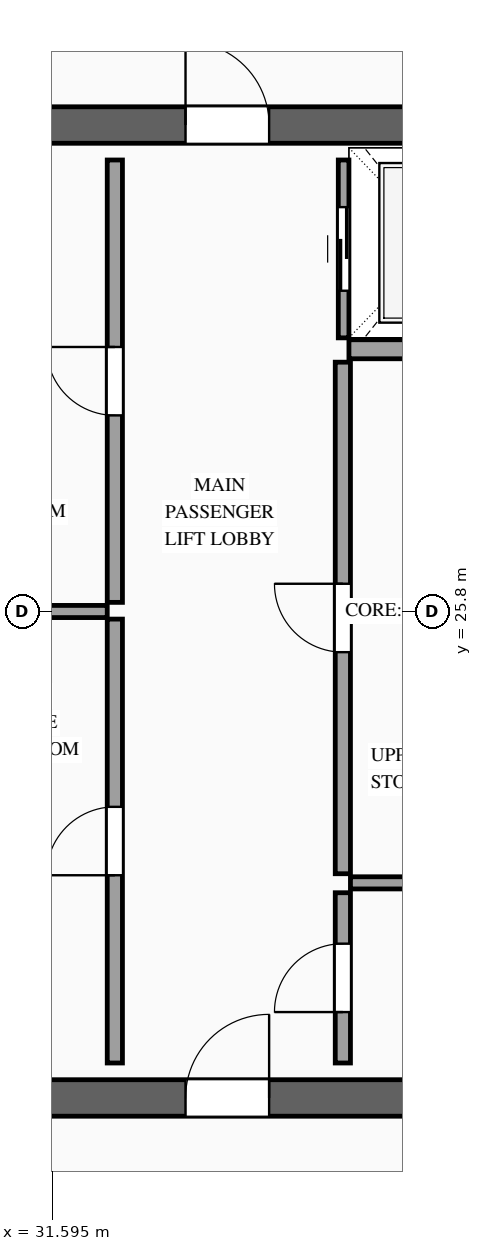
"""IFC4 building model, lengths in metres.
Left out: names, types, materials, properties, quantities, classifications, styles, units other than length and angle.
Written with IfcOpenShell. Run it as: python <this file> out.ifc"""

import sys

from ifc_helpers import new_model, si_unit, direction, frame, frame_2d, origin, place, context, subcontext, project, spatial, rectangle, extrude, source, transform, mapped, element, fill, save


model = new_model("IFC4")
c1 = context("Model", 3, precision=1e-05, world=origin(), true_north=direction((0.0, 1.0)))
c2 = subcontext(c1, "Body", "Model", "MODEL_VIEW")
j1 = project(units=[si_unit("LENGTHUNIT", "METRE"), si_unit("PLANEANGLEUNIT", "RADIAN")], contexts=[c1])
p1 = place(None, origin())
s1 = spatial("IfcSite", under=j1, at=p1, CompositionType="ELEMENT")
p2 = place(p1, origin())
s2 = spatial("IfcBuilding", under=s1, at=p2, CompositionType="ELEMENT")
p3 = place(p2, frame((0.0, 0.0, 296.1)))
s3 = spatial("IfcBuildingStorey", under=s2, at=p3, CompositionType="ELEMENT", Elevation=296.1)
p4 = place(p3, frame((23.56, 19.4, 0.0), z_axis=(0.0, 0.0, 1.0), x_axis=(1.0, 0.0, 0.0)))
e1 = element("IfcWall", 1, at=p4, inside=s3, PredefinedType="SHEAR", context=c2, shape_type="SweptSolid", body=[
    extrude(rectangle(XDim=26.88, YDim=0.48, at=frame_2d((13.44, 0.0))), origin(), (0.0, 0.0, 1.0), 3.5),
])
p5 = place(p4, frame((1.89, 0.0, 0.0)))
e2 = element("IfcOpeningElement", 2, at=p5, cuts=e1, PredefinedType="OPENING", context=c2, shape_type="SweptSolid", body=[
    extrude(rectangle(XDim=1.1, YDim=2.2, at=frame_2d((0.55, 1.1))), frame((0.0, 0.255, 0.0), z_axis=(0.0, -1.0, 0.0), x_axis=(1.0, 0.0, 0.0)), (0.0, 0.0, 1.0), 0.51),
])
p6 = place(p4, frame((9.79, 0.0, 0.0)))
e3 = element("IfcOpeningElement", 3, at=p6, cuts=e1, PredefinedType="OPENING", context=c2, shape_type="SweptSolid", body=[
    extrude(rectangle(XDim=1.1, YDim=2.2, at=frame_2d((0.55, 1.1))), frame((0.0, 0.255, 0.0), z_axis=(0.0, -1.0, 0.0), x_axis=(1.0, 0.0, 0.0)), (0.0, 0.0, 1.0), 0.51),
])
p7 = place(p4, frame((22.99, 0.0, 0.0)))
e4 = element("IfcOpeningElement", 4, at=p7, cuts=e1, PredefinedType="OPENING", context=c2, shape_type="SweptSolid", body=[
    extrude(rectangle(XDim=1.1, YDim=2.2, at=frame_2d((0.55, 1.1))), frame((0.0, 0.255, 0.0), z_axis=(0.0, -1.0, 0.0), x_axis=(1.0, 0.0, 0.0)), (0.0, 0.0, 1.0), 0.51),
])
p8 = place(p4, frame((19.61, 0.0, 0.0)))
e5 = element("IfcOpeningElement", 5, at=p8, cuts=e1, PredefinedType="OPENING", context=c2, shape_type="SweptSolid", body=[
    extrude(rectangle(XDim=0.9, YDim=2.15, at=frame_2d((0.45, 1.075))), frame((0.0, 0.255, 0.0), z_axis=(0.0, -1.0, 0.0), x_axis=(1.0, 0.0, 0.0)), (0.0, 0.0, 1.0), 0.51),
])
p9 = place(p4, frame((18.17, 0.0, 0.0)))
e6 = element("IfcOpeningElement", 6, at=p9, cuts=e1, PredefinedType="OPENING", context=c2, shape_type="SweptSolid", body=[
    extrude(rectangle(XDim=0.9, YDim=2.15, at=frame_2d((0.45, 1.075))), frame((0.0, 0.255, 0.0), z_axis=(0.0, -1.0, 0.0), x_axis=(1.0, 0.0, 0.0)), (0.0, 0.0, 1.0), 0.51),
])
p10 = place(p3, frame((23.56, 32.2, 0.0), z_axis=(0.0, 0.0, 1.0), x_axis=(1.0, 0.0, 0.0)))
e7 = element("IfcWall", 7, at=p10, inside=s3, PredefinedType="SHEAR", context=c2, shape_type="SweptSolid", body=[
    extrude(rectangle(XDim=26.88, YDim=0.48, at=frame_2d((13.44, 0.0))), origin(), (0.0, 0.0, 1.0), 3.5),
])
p11 = place(p10, frame((4.51, 0.0, 0.0)))
e8 = element("IfcOpeningElement", 8, at=p11, cuts=e7, PredefinedType="OPENING", context=c2, shape_type="SweptSolid", body=[
    extrude(rectangle(XDim=0.9, YDim=2.15, at=frame_2d((0.45, 1.075))), frame((0.0, 0.255, 0.0), z_axis=(0.0, -1.0, 0.0), x_axis=(1.0, 0.0, 0.0)), (0.0, 0.0, 1.0), 0.51),
])
p12 = place(p10, frame((9.79, 0.0, 0.0)))
e9 = element("IfcOpeningElement", 9, at=p12, cuts=e7, PredefinedType="OPENING", context=c2, shape_type="SweptSolid", body=[
    extrude(rectangle(XDim=1.1, YDim=2.2, at=frame_2d((0.55, 1.1))), frame((0.0, 0.255, 0.0), z_axis=(0.0, -1.0, 0.0), x_axis=(1.0, 0.0, 0.0)), (0.0, 0.0, 1.0), 0.51),
])
p13 = place(p10, frame((15.64, 0.0, 0.0)))
e10 = element("IfcOpeningElement", 10, at=p13, cuts=e7, PredefinedType="OPENING", context=c2, shape_type="SweptSolid", body=[
    extrude(rectangle(XDim=1.1, YDim=2.2, at=frame_2d((0.55, 1.1))), frame((0.0, 0.255, 0.0), z_axis=(0.0, -1.0, 0.0), x_axis=(1.0, 0.0, 0.0)), (0.0, 0.0, 1.0), 0.51),
])
p14 = place(p10, frame((18.74, 0.0, 0.0)))
e11 = element("IfcOpeningElement", 11, at=p14, cuts=e7, PredefinedType="OPENING", context=c2, shape_type="SweptSolid", body=[
    extrude(rectangle(XDim=1.1, YDim=2.2, at=frame_2d((0.55, 1.1))), frame((0.0, 0.255, 0.0), z_axis=(0.0, -1.0, 0.0), x_axis=(1.0, 0.0, 0.0)), (0.0, 0.0, 1.0), 0.51),
])
p15 = place(p3, frame((35.43, 29.4, 0.0), z_axis=(0.0, 0.0, 1.0), x_axis=(0.0, 1.0, 0.0)))
e12 = element("IfcWall", 12, at=p15, inside=s3, PredefinedType="SOLIDWALL", context=c2, shape_type="SweptSolid", body=[
    extrude(rectangle(XDim=2.34, YDim=0.14, at=frame_2d((1.17, 0.0))), origin(), (0.0, 0.0, 1.0), 3.28),
])
p16 = place(p15, frame((0.62, 0.0, 0.0)))
e13 = element("IfcOpeningElement", 13, at=p16, cuts=e12, PredefinedType="OPENING", context=c2, shape_type="SweptSolid", body=[
    extrude(rectangle(XDim=1.1, YDim=2.2, at=frame_2d((0.55, 1.1))), frame((0.0, 0.085, 0.0), z_axis=(0.0, -1.0, 0.0), x_axis=(1.0, 0.0, 0.0)), (0.0, 0.0, 1.0), 0.17),
])
m1 = source(origin(), c2, "Body", "SweptSolid", [
    extrude(rectangle(XDim=2.4, YDim=0.25, at=frame_2d((1.2, 0.0))), origin(), (0.0, 0.0, 1.0), 3.28),
])
p17 = place(p3, frame((35.5, 29.25, 0.0), z_axis=(0.0, 0.0, 1.0), x_axis=(1.0, 0.0, 0.0)))
e14 = element("IfcWall", 14, at=p17, inside=s3, PredefinedType="SOLIDWALL", context=c2, shape_type="MappedRepresentation", body=[
    mapped(m1, transform((0.0, 0.0, 0.0), scale=1.0)),
])
p18 = place(p3, frame((32.42, 19.86, 0.0), z_axis=(0.0, 0.0, 1.0), x_axis=(0.0, 1.0, 0.0)))
e15 = element("IfcWall", 15, at=p18, inside=s3, PredefinedType="PARTITIONING", context=c2, shape_type="SweptSolid", body=[
    extrude(rectangle(XDim=5.84, YDim=0.2, at=frame_2d((2.92, 0.0))), origin(), (0.0, 0.0, 1.0), 3.28),
])
p19 = place(p18, frame((2.47, 0.0, 0.0)))
e16 = element("IfcOpeningElement", 16, at=p19, cuts=e15, PredefinedType="OPENING", context=c2, shape_type="SweptSolid", body=[
    extrude(rectangle(XDim=0.9, YDim=2.15, at=frame_2d((0.45, 1.075))), frame((0.0, 0.115, 0.0), z_axis=(0.0, -1.0, 0.0), x_axis=(1.0, 0.0, 0.0)), (0.0, 0.0, 1.0), 0.23),
])
p20 = place(p3, frame((32.42, 25.92, 0.0), z_axis=(0.0, 0.0, 1.0), x_axis=(0.0, 1.0, 0.0)))
e17 = element("IfcWall", 17, at=p20, inside=s3, PredefinedType="PARTITIONING", context=c2, shape_type="SweptSolid", body=[
    extrude(rectangle(XDim=5.82, YDim=0.2, at=frame_2d((2.91, 0.0))), origin(), (0.0, 0.0, 1.0), 3.28),
])
p21 = place(p20, frame((2.46, 0.0, 0.0)))
e18 = element("IfcOpeningElement", 18, at=p21, cuts=e17, PredefinedType="OPENING", context=c2, shape_type="SweptSolid", body=[
    extrude(rectangle(XDim=0.9, YDim=2.15, at=frame_2d((0.45, 1.075))), frame((0.0, 0.115, 0.0), z_axis=(0.0, -1.0, 0.0), x_axis=(1.0, 0.0, 0.0)), (0.0, 0.0, 1.0), 0.23),
])
m2 = source(origin(), c2, "Body", "SweptSolid", [
    extrude(rectangle(XDim=2.47, YDim=0.16, at=frame_2d((1.235, 0.0))), origin(), (0.0, 0.0, 1.0), 3.28),
])
p22 = place(p3, frame((29.85, 25.8, 0.0), z_axis=(0.0, 0.0, 1.0), x_axis=(1.0, 0.0, 0.0)))
e19 = element("IfcWall", 19, at=p22, inside=s3, PredefinedType="PARTITIONING", context=c2, shape_type="MappedRepresentation", body=[
    mapped(m2, transform((0.0, 0.0, 0.0), scale=1.0)),
])
p23 = place(p3, frame((35.42, 19.86, 0.0), z_axis=(0.0, 0.0, 1.0), x_axis=(0.0, 1.0, 0.0)))
e20 = element("IfcWall", 20, at=p23, inside=s3, PredefinedType="PARTITIONING", context=c2, shape_type="SweptSolid", body=[
    extrude(rectangle(XDim=2.24, YDim=0.2, at=frame_2d((1.12, 0.0))), origin(), (0.0, 0.0, 1.0), 3.28),
])
p24 = place(p23, frame((0.67, 0.0, 0.0)))
e21 = element("IfcOpeningElement", 21, at=p24, cuts=e20, PredefinedType="OPENING", context=c2, shape_type="SweptSolid", body=[
    extrude(rectangle(XDim=0.9, YDim=2.15, at=frame_2d((0.45, 1.075))), frame((0.0, 0.115, 0.0), z_axis=(0.0, -1.0, 0.0), x_axis=(1.0, 0.0, 0.0)), (0.0, 0.0, 1.0), 0.23),
])
p25 = place(p3, frame((35.42, 22.35, 0.0), z_axis=(0.0, 0.0, 1.0), x_axis=(0.0, 1.0, 0.0)))
e22 = element("IfcWall", 22, at=p25, inside=s3, PredefinedType="PARTITIONING", context=c2, shape_type="SweptSolid", body=[
    extrude(rectangle(XDim=6.73, YDim=0.2, at=frame_2d((3.365, 0.0))), origin(), (0.0, 0.0, 1.0), 3.28),
])
p26 = place(p25, frame((2.915, 0.0, 0.0)))
e23 = element("IfcOpeningElement", 23, at=p26, cuts=e22, PredefinedType="OPENING", context=c2, shape_type="SweptSolid", body=[
    extrude(rectangle(XDim=0.9, YDim=2.15, at=frame_2d((0.45, 1.075))), frame((0.0, 0.115, 0.0), z_axis=(0.0, -1.0, 0.0), x_axis=(1.0, 0.0, 0.0)), (0.0, 0.0, 1.0), 0.23),
])
m3 = source(origin(), c2, "Body", "SweptSolid", [
    extrude(rectangle(XDim=2.36, YDim=0.16, at=frame_2d((1.18, 0.0))), origin(), (0.0, 0.0, 1.0), 3.28),
])
p27 = place(p3, frame((35.52, 22.23, 0.0), z_axis=(0.0, 0.0, 1.0), x_axis=(1.0, 0.0, 0.0)))
e24 = element("IfcWall", 24, at=p27, inside=s3, PredefinedType="PARTITIONING", context=c2, shape_type="MappedRepresentation", body=[
    mapped(m3, transform((0.0, 0.0, 0.0), scale=1.0)),
])
m4 = source(origin(), c2, "Body", "SweptSolid", [
    extrude(rectangle(XDim=1.1, YDim=2.2, at=frame_2d((0.55, 1.1))), frame((0.0, 0.025, 0.0), z_axis=(0.0, -1.0, 0.0), x_axis=(1.0, 0.0, 0.0)), (0.0, 0.0, 1.0), 0.05),
])
p28 = place(p16, origin())
e25 = element("IfcDoor", 25, at=p28, inside=s3, OperationType="SLIDING_TO_RIGHT", PredefinedType="DOOR", context=c2, shape_type="MappedRepresentation", body=[
    mapped(m4, transform((0.0, 0.0, 0.0), scale=1.0)),
])
fill(e13, e25)
m5 = source(origin(), c2, "Body", "SweptSolid", [
    extrude(rectangle(XDim=1.1, YDim=2.2, at=frame_2d((0.55, 1.1))), frame((0.0, 0.025, 0.0), z_axis=(0.0, -1.0, 0.0), x_axis=(1.0, 0.0, 0.0)), (0.0, 0.0, 1.0), 0.05),
])
p29 = place(p6, origin())
e26 = element("IfcDoor", 26, at=p29, inside=s3, OperationType="SINGLE_SWING_RIGHT", PredefinedType="DOOR", context=c2, shape_type="MappedRepresentation", body=[
    mapped(m5, transform((0.0, 0.0, 0.0), scale=1.0)),
])
fill(e3, e26)
p30 = place(p12, origin())
e27 = element("IfcDoor", 27, at=p30, inside=s3, OperationType="SINGLE_SWING_LEFT", PredefinedType="DOOR", context=c2, shape_type="MappedRepresentation", body=[
    mapped(m5, transform((0.0, 0.0, 0.0), scale=1.0)),
])
fill(e9, e27)
m6 = source(origin(), c2, "Body", "SweptSolid", [
    extrude(rectangle(XDim=0.9, YDim=2.15, at=frame_2d((0.45, 1.075))), frame((0.0, 0.025, 0.0), z_axis=(0.0, -1.0, 0.0), x_axis=(1.0, 0.0, 0.0)), (0.0, 0.0, 1.0), 0.05),
])
p31 = place(p19, origin())
e28 = element("IfcDoor", 28, at=p31, inside=s3, OperationType="SINGLE_SWING_LEFT", PredefinedType="DOOR", context=c2, shape_type="MappedRepresentation", body=[
    mapped(m6, transform((0.0, 0.0, 0.0), scale=1.0)),
])
fill(e16, e28)
p32 = place(p21, origin())
e29 = element("IfcDoor", 29, at=p32, inside=s3, OperationType="SINGLE_SWING_RIGHT", PredefinedType="DOOR", context=c2, shape_type="MappedRepresentation", body=[
    mapped(m6, transform((0.0, 0.0, 0.0), scale=1.0)),
])
fill(e18, e29)
p33 = place(p24, origin())
e30 = element("IfcDoor", 30, at=p33, inside=s3, OperationType="SINGLE_SWING_LEFT", PredefinedType="DOOR", context=c2, shape_type="MappedRepresentation", body=[
    mapped(m6, transform((0.0, 0.0, 0.0), scale=1.0)),
])
fill(e21, e30)
p34 = place(p26, origin())
e31 = element("IfcDoor", 31, at=p34, inside=s3, OperationType="SINGLE_SWING_RIGHT", PredefinedType="DOOR", context=c2, shape_type="MappedRepresentation", body=[
    mapped(m6, transform((0.0, 0.0, 0.0), scale=1.0)),
])
fill(e23, e31)
save(model, sys.argv[1])
